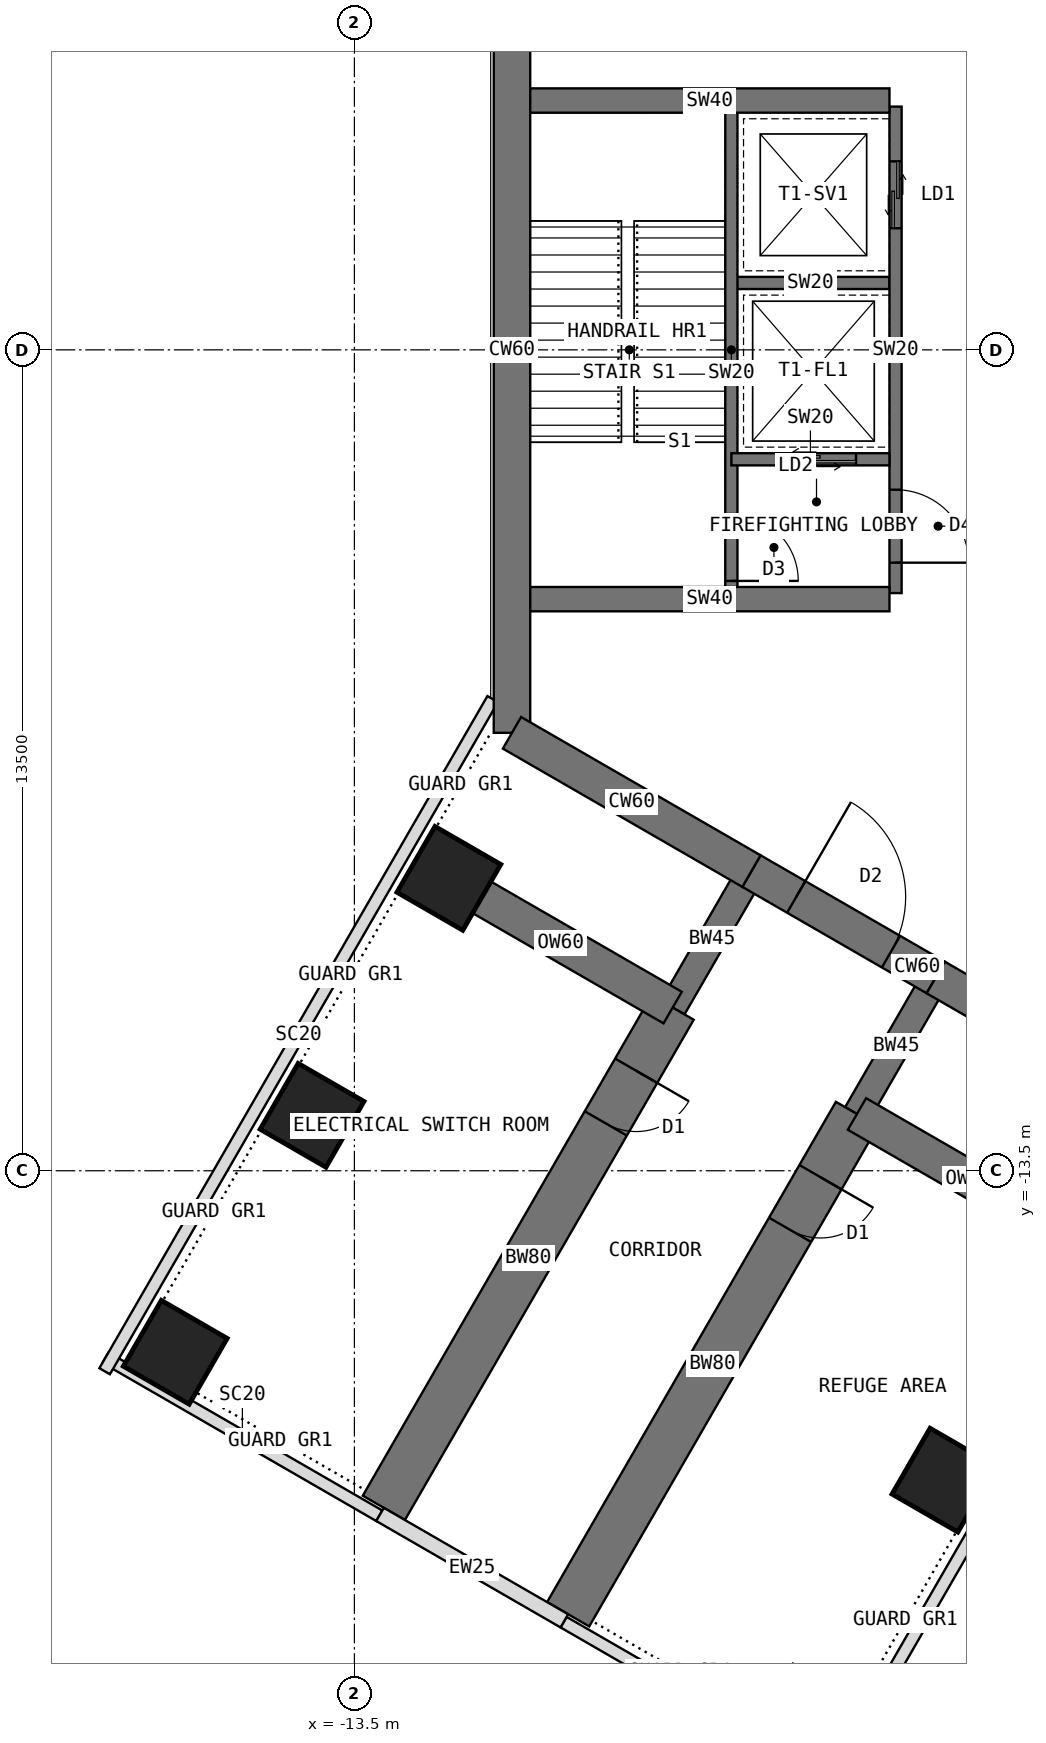
"""IFC4 building model, lengths in metres.
Left out: names, types, materials, properties, quantities, classifications, styles, units other than length and angle.
Written with IfcOpenShell. Run it as: python <this file> out.ifc"""

import sys

from ifc_helpers import new_model, si_unit, direction, frame, frame_2d, origin, origin_2d, place, context, subcontext, project, spatial, rectangle, extrude, element, fill, save


model = new_model("IFC4")
c1 = context("Model", 3, precision=1e-05, world=origin(), true_north=direction((0.0, 1.0)))
c2 = subcontext(c1, "Body", "Model", "MODEL_VIEW")
j1 = project(units=[si_unit("LENGTHUNIT", "METRE"), si_unit("PLANEANGLEUNIT", "RADIAN")], contexts=[c1])
p1 = place(None, origin())
s1 = spatial("IfcSite", under=j1, at=p1, CompositionType="ELEMENT")
p2 = place(p1, origin())
s2 = spatial("IfcBuilding", under=s1, at=p2, CompositionType="ELEMENT")
p3 = place(p2, frame((0.0, 0.0, 165.5)))
s3 = spatial("IfcBuildingStorey", under=s2, at=p3, CompositionType="ELEMENT", Elevation=165.5)
p4 = place(p3, frame((-10.908, 6.298, 0.0), z_axis=(0.0, 0.0, 1.0), x_axis=(0.0, -1.0, 0.0)))
e1 = element("IfcWall", 1, at=p4, inside=s3, PredefinedType="SHEAR", context=c2, shape_type="SweptSolid", body=[
    extrude(rectangle(XDim=12.596, YDim=0.6, at=frame_2d((6.298, 0.0))), origin(), (0.0, 0.0, 1.0), 5.0),
])
p5 = place(p3, frame((-10.908, -6.298, 0.0), z_axis=(0.0, 0.0, 1.0), x_axis=(0.866034513004, -0.499984222037, 0.0)))
e2 = element("IfcWall", 2, at=p5, inside=s3, PredefinedType="SHEAR", context=c2, shape_type="SweptSolid", body=[
    extrude(rectangle(XDim=4.548, YDim=0.6, at=frame_2d((2.274, 0.0))), origin(), (0.0, 0.0, 1.0), 5.0),
])
p6 = place(p3, frame((-6.97, -8.572, 0.0), z_axis=(0.0, 0.0, 1.0), x_axis=(0.866019471182, -0.500010275428, 0.0)))
e3 = element("IfcWall", 3, at=p6, inside=s3, PredefinedType="SHEAR", context=c2, shape_type="SweptSolid", body=[
    extrude(rectangle(XDim=3.5, YDim=0.6, at=frame_2d((1.75, 0.0))), origin(), (0.0, 0.0, 1.0), 5.0),
])
p7 = place(p6, frame((0.85, 0.0, 0.0)))
e4 = element("IfcOpeningElement", 4, at=p7, cuts=e3, PredefinedType="OPENING", context=c2, shape_type="SweptSolid", body=[
    extrude(rectangle(XDim=1.8, YDim=2.1, at=frame_2d((0.9, 1.05))), frame((0.0, 0.31, 0.0), z_axis=(0.0, -1.0, 0.0), x_axis=(1.0, 0.0, 0.0)), (0.0, 0.0, 1.0), 0.62),
])
p8 = place(p3, frame((-3.939, -10.322, 0.0), z_axis=(0.0, 0.0, 1.0), x_axis=(0.866011268655, -0.500024481964, 0.0)))
e5 = element("IfcWall", 5, at=p8, inside=s3, PredefinedType="SHEAR", context=c2, shape_type="SweptSolid", body=[
    extrude(rectangle(XDim=4.548, YDim=0.6, at=frame_2d((2.274, 0.0))), origin(), (0.0, 0.0, 1.0), 5.0),
])
p9 = place(p3, frame((-3.939, -10.322, 0.0), z_axis=(0.0, 0.0, 1.0), x_axis=(-0.499918158782, -0.866072649678, 0.0)))
e6 = element("IfcWall", 6, at=p9, inside=s3, PredefinedType="SHEAR", context=c2, shape_type="SweptSolid", body=[
    extrude(rectangle(XDim=2.592, YDim=0.45, at=frame_2d((1.296, 0.0))), origin(), (0.0, 0.0, 1.0), 5.0),
])
p10 = place(p3, frame((-5.234, -12.566, 0.0), z_axis=(0.0, 0.0, 1.0), x_axis=(-0.499997557548, -0.86602681393, 0.0)))
e7 = element("IfcWall", 7, at=p10, inside=s3, PredefinedType="SHEAR", context=c2, shape_type="SweptSolid", body=[
    extrude(rectangle(XDim=9.5, YDim=0.8, at=frame_2d((4.75, 0.0))), origin(), (0.0, 0.0, 1.0), 5.0),
])
p11 = place(p10, frame((1.2, 0.0, 0.0)))
e8 = element("IfcOpeningElement", 8, at=p11, cuts=e7, PredefinedType="OPENING", context=c2, shape_type="SweptSolid", body=[
    extrude(rectangle(XDim=1.0, YDim=2.1, at=frame_2d((0.5, 1.05))), frame((0.0, 0.41, 0.0), z_axis=(0.0, -1.0, 0.0), x_axis=(1.0, 0.0, 0.0)), (0.0, 0.0, 1.0), 0.82),
])
p12 = place(p3, frame((-6.97, -8.572, 0.0), z_axis=(0.0, 0.0, 1.0), x_axis=(-0.499988811324, -0.866031863473, 0.0)))
e9 = element("IfcWall", 9, at=p12, inside=s3, PredefinedType="SHEAR", context=c2, shape_type="SweptSolid", body=[
    extrude(rectangle(XDim=2.592, YDim=0.45, at=frame_2d((1.296, 0.0))), origin(), (0.0, 0.0, 1.0), 5.0),
])
p13 = place(p3, frame((-8.266, -10.816, 0.0), z_axis=(0.0, 0.0, 1.0), x_axis=(-0.499997557548, -0.86602681393, 0.0)))
e10 = element("IfcWall", 10, at=p13, inside=s3, PredefinedType="SHEAR", context=c2, shape_type="SweptSolid", body=[
    extrude(rectangle(XDim=9.5, YDim=0.8, at=frame_2d((4.75, 0.0))), origin(), (0.0, 0.0, 1.0), 5.0),
])
p14 = place(p13, frame((1.2, 0.0, 0.0)))
e11 = element("IfcOpeningElement", 11, at=p14, cuts=e10, PredefinedType="OPENING", context=c2, shape_type="SweptSolid", body=[
    extrude(rectangle(XDim=1.0, YDim=2.1, at=frame_2d((0.5, 1.05))), frame((0.0, 0.41, 0.0), z_axis=(0.0, -1.0, 0.0), x_axis=(1.0, 0.0, 0.0)), (0.0, 0.0, 1.0), 0.82),
])
for number, where, z_axis, x_axis in (
    (12, (-11.946, -8.691, 0.0), (0.0, 0.0, 1.0), (0.5, 0.866, 0.0)),
    (13, (-3.804, -18.588, 0.0), (0.0, 0.0, 1.0), (0.5, 0.866, 0.0)),
    (14, (-14.196, -12.588, 0.0), (0.0, 0.0, 1.0), (0.5, 0.866, 0.0)),
    (15, (-16.446, -16.486, 0.0), (0.0, 0.0, 1.0), (0.5, 0.866, 0.0)),
):
    element("IfcColumn", number, at=place(p3, frame(where, z_axis=z_axis, x_axis=x_axis)), inside=s3, PredefinedType="COLUMN", context=c2, shape_type="SweptSolid", body=[
        extrude(rectangle(XDim=1.25, YDim=1.25, at=origin_2d()), origin(), (0.0, 0.0, 1.0), 5.0),
    ])
for number, where, z_axis, x_axis in (
    (16, (-5.234, -12.566, 0.0), (0.0, 0.0, 1.0), (0.866, -0.5, 0.0)),
    (17, (-8.266, -10.816, 0.0), (0.0, 0.0, 1.0), (-0.866, 0.5, 0.0)),
):
    element("IfcWall", number, at=place(p3, frame(where, z_axis=z_axis, x_axis=x_axis)), inside=s3, PredefinedType="SHEAR", context=c2, shape_type="SweptSolid", body=[
        extrude(rectangle(XDim=4.25, YDim=0.6, at=frame_2d((2.125, 0.0))), origin(), (0.0, 0.0, 1.0), 5.0),
    ])
for number, where, z_axis, x_axis in (
    (18, (0.639, -12.594, 0.0), (0.0, 0.0, 1.0), (-0.5, -0.866, 0.0)),
    (19, (-17.607, -16.797, 0.0), (0.0, 0.0, 1.0), (0.5, 0.866, 0.0)),
):
    element("IfcWall", number, at=place(p3, frame(where, z_axis=z_axis, x_axis=x_axis)), inside=s3, PredefinedType="USERDEFINED", context=c2, shape_type="SweptSolid", body=[
        extrude(rectangle(XDim=12.763, YDim=0.2, at=frame_2d((6.381, 0.0))), origin(), (0.0, 0.0, 1.0), 4.8),
    ])
p15 = place(p3, frame((-17.594, -16.573, 0.0), z_axis=(0.0, 0.0, 1.0), x_axis=(0.866021400173, -0.500006934395, 0.0)))
e20 = element("IfcWall", 20, at=p15, inside=s3, PredefinedType="USERDEFINED", context=c2, shape_type="SweptSolid", body=[
    extrude(rectangle(XDim=5.2, YDim=0.2, at=frame_2d((2.6, 0.0))), origin(), (0.0, 0.0, 1.0), 4.8),
])
p16 = place(p3, frame((-13.078, -19.152, 0.0), z_axis=(0.0, 0.0, 1.0), x_axis=(0.866036909293, -0.499980071345, 0.0)))
e21 = element("IfcWall", 21, at=p16, inside=s3, PredefinedType="STANDARD", context=c2, shape_type="SweptSolid", body=[
    extrude(rectangle(XDim=3.5, YDim=0.25, at=frame_2d((1.75, 0.0))), origin(), (0.0, 0.0, 1.0), 4.8),
])
p17 = place(p3, frame((-10.06, -20.924, 0.0), z_axis=(0.0, 0.0, 1.0), x_axis=(0.866041729639, -0.499971721724, 0.0)))
e22 = element("IfcWall", 22, at=p17, inside=s3, PredefinedType="USERDEFINED", context=c2, shape_type="SweptSolid", body=[
    extrude(rectangle(XDim=5.2, YDim=0.2, at=frame_2d((2.6, 0.0))), origin(), (0.0, 0.0, 1.0), 4.8),
])
p18 = place(p3, frame((-4.6, 4.0, 0.0), z_axis=(0.0, 0.0, 1.0), x_axis=(0.0, -1.0, 0.0)))
e23 = element("IfcWall", 23, at=p18, inside=s3, PredefinedType="SHEAR", context=c2, shape_type="SweptSolid", body=[
    extrude(rectangle(XDim=8.0, YDim=0.2, at=frame_2d((4.0, 0.0))), origin(), (0.0, 0.0, 1.0), 5.0),
])
p19 = place(p18, frame((6.3, 0.0, 0.0)))
e24 = element("IfcOpeningElement", 24, at=p19, cuts=e23, PredefinedType="OPENING", context=c2, shape_type="SweptSolid", body=[
    extrude(rectangle(XDim=1.2, YDim=2.1, at=frame_2d((0.6, 1.05))), frame((0.0, 0.11, 0.0), z_axis=(0.0, -1.0, 0.0), x_axis=(1.0, 0.0, 0.0)), (0.0, 0.0, 1.0), 0.22),
])
p20 = place(p18, frame((0.9, 0.0, 0.0)))
e25 = element("IfcOpeningElement", 25, at=p20, cuts=e23, PredefinedType="OPENING", context=c2, shape_type="SweptSolid", body=[
    extrude(rectangle(XDim=1.1, YDim=2.2, at=frame_2d((0.55, 1.1))), frame((0.0, 0.11, 0.0), z_axis=(0.0, -1.0, 0.0), x_axis=(1.0, 0.0, 0.0)), (0.0, 0.0, 1.0), 0.22),
])
p21 = place(p3, frame((-4.7, 1.1, 0.0), z_axis=(0.0, 0.0, 1.0), x_axis=(-1.0, 0.0, 0.0)))
e26 = element("IfcWall", 26, at=p21, inside=s3, PredefinedType="SHEAR", context=c2, shape_type="SweptSolid", body=[
    extrude(rectangle(XDim=2.6, YDim=0.2, at=frame_2d((1.3, 0.0))), origin(), (0.0, 0.0, 1.0), 5.0),
])
p22 = place(p3, frame((-4.7, -1.8, 0.0), z_axis=(0.0, 0.0, 1.0), x_axis=(-1.0, 0.0, 0.0)))
e27 = element("IfcWall", 27, at=p22, inside=s3, PredefinedType="SHEAR", context=c2, shape_type="SweptSolid", body=[
    extrude(rectangle(XDim=2.6, YDim=0.2, at=frame_2d((1.3, 0.0))), origin(), (0.0, 0.0, 1.0), 5.0),
])
p23 = place(p22, frame((0.55, 0.0, 0.0)))
e28 = element("IfcOpeningElement", 28, at=p23, cuts=e27, PredefinedType="OPENING", context=c2, shape_type="SweptSolid", body=[
    extrude(rectangle(XDim=1.3, YDim=2.2, at=frame_2d((0.65, 1.1))), frame((0.0, 0.11, 0.0), z_axis=(0.0, -1.0, 0.0), x_axis=(1.0, 0.0, 0.0)), (0.0, 0.0, 1.0), 0.22),
])
p24 = place(p3, frame((-7.3, 4.0, 0.0), z_axis=(0.0, 0.0, 1.0), x_axis=(0.0, -1.0, 0.0)))
e29 = element("IfcWall", 29, at=p24, inside=s3, PredefinedType="SHEAR", context=c2, shape_type="SweptSolid", body=[
    extrude(rectangle(XDim=8.0, YDim=0.2, at=frame_2d((4.0, 0.0))), origin(), (0.0, 0.0, 1.0), 5.0),
])
p25 = place(p24, frame((6.7, 0.0, 0.0)))
e30 = element("IfcOpeningElement", 30, at=p25, cuts=e29, PredefinedType="OPENING", context=c2, shape_type="SweptSolid", body=[
    extrude(rectangle(XDim=1.1, YDim=2.1, at=frame_2d((0.55, 1.05))), frame((0.0, 0.11, 0.0), z_axis=(0.0, -1.0, 0.0), x_axis=(1.0, 0.0, 0.0)), (0.0, 0.0, 1.0), 0.22),
])
for number, where, z_axis, x_axis in (
    (31, (-4.7, -4.1, 0.0), (0.0, 0.0, 1.0), (-1.0, 0.0, 0.0)),
    (32, (-4.7, 4.1, 0.0), (0.0, 0.0, 1.0), (-1.0, 0.0, 0.0)),
):
    element("IfcWall", number, at=place(p3, frame(where, z_axis=z_axis, x_axis=x_axis)), inside=s3, PredefinedType="SHEAR", context=c2, shape_type="SweptSolid", body=[
        extrude(rectangle(XDim=5.908, YDim=0.4, at=frame_2d((2.954, 0.0))), origin(), (0.0, 0.0, 1.0), 5.0),
    ])
p26 = place(p19, origin())
e33 = element("IfcDoor", 33, at=p26, inside=s3, OperationType="SINGLE_SWING_RIGHT", PredefinedType="DOOR", context=c2, shape_type="SweptSolid", body=[
    extrude(rectangle(XDim=1.2, YDim=2.1, at=frame_2d((0.6, 1.05))), frame((0.0, 0.025, 0.0), z_axis=(0.0, -1.0, 0.0), x_axis=(1.0, 0.0, 0.0)), (0.0, 0.0, 1.0), 0.05),
])
fill(e24, e33)
p27 = place(p23, origin())
e34 = element("IfcDoor", 34, at=p27, inside=s3, OperationType="DOUBLE_DOOR_SLIDING", PredefinedType="DOOR", context=c2, shape_type="SweptSolid", body=[
    extrude(rectangle(XDim=1.3, YDim=2.2, at=frame_2d((0.65, 1.1))), frame((0.0, 0.025, 0.0), z_axis=(0.0, -1.0, 0.0), x_axis=(1.0, 0.0, 0.0)), (0.0, 0.0, 1.0), 0.05),
])
fill(e28, e34)
p28 = place(p20, origin())
e35 = element("IfcDoor", 35, at=p28, inside=s3, OperationType="DOUBLE_DOOR_SLIDING", PredefinedType="DOOR", context=c2, shape_type="SweptSolid", body=[
    extrude(rectangle(XDim=1.1, YDim=2.2, at=frame_2d((0.55, 1.1))), frame((0.0, 0.025, 0.0), z_axis=(0.0, -1.0, 0.0), x_axis=(1.0, 0.0, 0.0)), (0.0, 0.0, 1.0), 0.05),
])
fill(e25, e35)
p29 = place(p25, origin())
e36 = element("IfcDoor", 36, at=p29, inside=s3, OperationType="SINGLE_SWING_RIGHT", PredefinedType="DOOR", context=c2, shape_type="SweptSolid", body=[
    extrude(rectangle(XDim=1.1, YDim=2.1, at=frame_2d((0.55, 1.05))), frame((0.0, 0.025, 0.0), z_axis=(0.0, -1.0, 0.0), x_axis=(1.0, 0.0, 0.0)), (0.0, 0.0, 1.0), 0.05),
])
fill(e30, e36)
p30 = place(p7, origin())
e37 = element("IfcDoor", 37, at=p30, inside=s3, OperationType="DOUBLE_DOOR_DOUBLE_SWING", PredefinedType="DOOR", context=c2, shape_type="SweptSolid", body=[
    extrude(rectangle(XDim=1.72, YDim=2.06, at=frame_2d((0.9, 1.03))), frame((0.0, 0.025, 0.0), z_axis=(0.0, -1.0, 0.0), x_axis=(1.0, 0.0, 0.0)), (0.0, 0.0, 1.0), 0.05),
    extrude(rectangle(XDim=0.04, YDim=2.1, at=frame_2d((0.02, 1.05))), frame((0.0, 0.3, 0.0), z_axis=(0.0, -1.0, 0.0), x_axis=(1.0, 0.0, 0.0)), (0.0, 0.0, 1.0), 0.6),
    extrude(rectangle(XDim=0.04, YDim=2.1, at=frame_2d((1.78, 1.05))), frame((0.0, 0.3, 0.0), z_axis=(0.0, -1.0, 0.0), x_axis=(1.0, 0.0, 0.0)), (0.0, 0.0, 1.0), 0.6),
    extrude(rectangle(XDim=1.72, YDim=0.04, at=frame_2d((0.9, 2.08))), frame((0.0, 0.3, 0.0), z_axis=(0.0, -1.0, 0.0), x_axis=(1.0, 0.0, 0.0)), (0.0, 0.0, 1.0), 0.6),
])
fill(e4, e37)
p31 = place(p11, origin())
e38 = element("IfcDoor", 38, at=p31, inside=s3, OperationType="SINGLE_SWING_LEFT", PredefinedType="DOOR", context=c2, shape_type="SweptSolid", body=[
    extrude(rectangle(XDim=0.92, YDim=2.06, at=frame_2d((0.5, 1.03))), frame((0.0, 0.025, 0.0), z_axis=(0.0, -1.0, 0.0), x_axis=(1.0, 0.0, 0.0)), (0.0, 0.0, 1.0), 0.05),
    extrude(rectangle(XDim=0.04, YDim=2.1, at=frame_2d((0.02, 1.05))), frame((0.0, 0.4, 0.0), z_axis=(0.0, -1.0, 0.0), x_axis=(1.0, 0.0, 0.0)), (0.0, 0.0, 1.0), 0.8),
    extrude(rectangle(XDim=0.04, YDim=2.1, at=frame_2d((0.98, 1.05))), frame((0.0, 0.4, 0.0), z_axis=(0.0, -1.0, 0.0), x_axis=(1.0, 0.0, 0.0)), (0.0, 0.0, 1.0), 0.8),
    extrude(rectangle(XDim=0.92, YDim=0.04, at=frame_2d((0.5, 2.08))), frame((0.0, 0.4, 0.0), z_axis=(0.0, -1.0, 0.0), x_axis=(1.0, 0.0, 0.0)), (0.0, 0.0, 1.0), 0.8),
])
fill(e8, e38)
p32 = place(p14, origin())
e39 = element("IfcDoor", 39, at=p32, inside=s3, OperationType="SINGLE_SWING_LEFT", PredefinedType="DOOR", context=c2, shape_type="SweptSolid", body=[
    extrude(rectangle(XDim=0.92, YDim=2.06, at=frame_2d((0.5, 1.03))), frame((0.0, 0.025, 0.0), z_axis=(0.0, -1.0, 0.0), x_axis=(1.0, 0.0, 0.0)), (0.0, 0.0, 1.0), 0.05),
    extrude(rectangle(XDim=0.04, YDim=2.1, at=frame_2d((0.02, 1.05))), frame((0.0, 0.4, 0.0), z_axis=(0.0, -1.0, 0.0), x_axis=(1.0, 0.0, 0.0)), (0.0, 0.0, 1.0), 0.8),
    extrude(rectangle(XDim=0.04, YDim=2.1, at=frame_2d((0.98, 1.05))), frame((0.0, 0.4, 0.0), z_axis=(0.0, -1.0, 0.0), x_axis=(1.0, 0.0, 0.0)), (0.0, 0.0, 1.0), 0.8),
    extrude(rectangle(XDim=0.92, YDim=0.04, at=frame_2d((0.5, 2.08))), frame((0.0, 0.4, 0.0), z_axis=(0.0, -1.0, 0.0), x_axis=(1.0, 0.0, 0.0)), (0.0, 0.0, 1.0), 0.8),
])
fill(e11, e39)
save(model, sys.argv[1])
